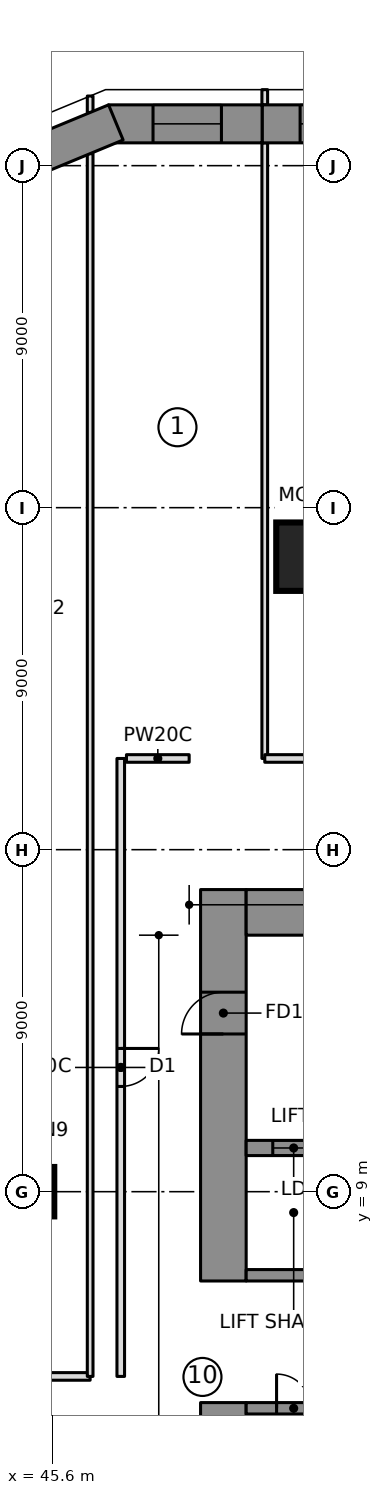
"""IFC4 building model, lengths in metres.
Left out: names, types, materials, properties, quantities, classifications, styles, units other than length and angle.
Written with IfcOpenShell. Run it as: python <this file> out.ifc"""

import sys

from ifc_helpers import new_model, si_unit, direction, frame, frame_2d, origin, origin_2d, place, context, subcontext, project, spatial, polyline, rectangle, outline, extrude, element, fill, save


model = new_model("IFC4")
c1 = context("Model", 3, precision=1e-05, world=origin(), true_north=direction((0.0, 1.0)))
c2 = subcontext(c1, "Body", "Model", "MODEL_VIEW")
j1 = project(units=[si_unit("LENGTHUNIT", "METRE"), si_unit("PLANEANGLEUNIT", "RADIAN")], contexts=[c1])
p1 = place(None, origin())
s1 = spatial("IfcSite", under=j1, at=p1, CompositionType="ELEMENT")
p2 = place(p1, origin())
s2 = spatial("IfcBuilding", under=s1, at=p2, CompositionType="ELEMENT")
p3 = place(p2, frame((0.0, 0.0, 19.0)))
s3 = spatial("IfcBuildingStorey", under=s2, at=p3, CompositionType="ELEMENT", Elevation=19.0)
p4 = place(p3, frame((50.1, 6.65, 0.0), z_axis=(0.0, 0.0, 1.0), x_axis=(0.0, 1.0, 0.0)))
e1 = element("IfcWall", 1, at=p4, inside=s3, PredefinedType="SHEAR", context=c2, shape_type="SweptSolid", body=[
    extrude(rectangle(XDim=10.3, YDim=1.2, at=frame_2d((5.15, 0.0))), origin(), (0.0, 0.0, 1.0), 5.0),
])
p5 = place(p4, frame((6.5, 0.0, 0.0)))
e2 = element("IfcOpeningElement", 2, at=p5, cuts=e1, PredefinedType="OPENING", context=c2, shape_type="SweptSolid", body=[
    extrude(rectangle(XDim=1.1, YDim=2.1, at=frame_2d((0.55, 1.05))), frame((0.0, 0.61, 0.0), z_axis=(0.0, -1.0, 0.0), x_axis=(1.0, 0.0, 0.0)), (0.0, 0.0, 1.0), 1.22),
])
p6 = place(p3, frame((50.1, -3.45, 0.0), z_axis=(0.0, 0.0, 1.0), x_axis=(0.0, 1.0, 0.0)))
e3 = element("IfcWall", 3, at=p6, inside=s3, PredefinedType="SHEAR", context=c2, shape_type="SweptSolid", body=[
    extrude(rectangle(XDim=6.9, YDim=1.2, at=frame_2d((3.45, 0.0))), origin(), (0.0, 0.0, 1.0), 5.0),
])
p7 = place(p3, frame((50.7, 16.35, 0.0), z_axis=(0.0, 0.0, 1.0), x_axis=(1.0, 0.0, 0.0)))
e4 = element("IfcWall", 4, at=p7, inside=s3, PredefinedType="SHEAR", context=c2, shape_type="SweptSolid", body=[
    extrude(rectangle(XDim=13.38, YDim=1.2, at=frame_2d((6.69, 0.0))), origin(), (0.0, 0.0, 1.0), 5.0),
])
p8 = place(p3, frame((50.7, 10.15, 0.0), z_axis=(0.0, 0.0, 1.0), x_axis=(1.0, 0.0, 0.0)))
e5 = element("IfcWall", 5, at=p8, inside=s3, PredefinedType="SHEAR", context=c2, shape_type="SweptSolid", body=[
    extrude(rectangle(XDim=12.18, YDim=0.4, at=frame_2d((6.09, 0.0))), origin(), (0.0, 0.0, 1.0), 5.0),
])
p9 = place(p8, frame((0.7, 0.0, 0.0)))
e6 = element("IfcOpeningElement", 6, at=p9, cuts=e5, PredefinedType="OPENING", context=c2, shape_type="SweptSolid", body=[
    extrude(rectangle(XDim=1.1, YDim=2.1, at=frame_2d((0.55, 1.05))), frame((0.0, 0.21, 0.0), z_axis=(0.0, -1.0, 0.0), x_axis=(1.0, 0.0, 0.0)), (0.0, 0.0, 1.0), 0.42),
])
p10 = place(p8, frame((3.5, 0.0, 0.0)))
e7 = element("IfcOpeningElement", 7, at=p10, cuts=e5, PredefinedType="OPENING", context=c2, shape_type="SweptSolid", body=[
    extrude(rectangle(XDim=1.1, YDim=2.1, at=frame_2d((0.55, 1.05))), frame((0.0, 0.21, 0.0), z_axis=(0.0, -1.0, 0.0), x_axis=(1.0, 0.0, 0.0)), (0.0, 0.0, 1.0), 0.42),
])
p11 = place(p3, frame((50.7, 3.3, 0.0), z_axis=(0.0, 0.0, 1.0), x_axis=(1.0, 0.0, 0.0)))
e8 = element("IfcWall", 8, at=p11, inside=s3, PredefinedType="SHEAR", context=c2, shape_type="SweptSolid", body=[
    extrude(rectangle(XDim=10.9, YDim=0.3, at=frame_2d((5.45, 0.0))), origin(), (0.0, 0.0, 1.0), 5.0),
])
p12 = place(p11, frame((0.8, 0.0, 0.0)))
e9 = element("IfcOpeningElement", 9, at=p12, cuts=e8, PredefinedType="OPENING", context=c2, shape_type="SweptSolid", body=[
    extrude(rectangle(XDim=0.9, YDim=2.1, at=frame_2d((0.45, 1.05))), frame((0.0, 0.16, 0.0), z_axis=(0.0, -1.0, 0.0), x_axis=(1.0, 0.0, 0.0)), (0.0, 0.0, 1.0), 0.32),
])
p13 = place(p11, frame((3.6, 0.0, 0.0)))
e10 = element("IfcOpeningElement", 10, at=p13, cuts=e8, PredefinedType="OPENING", context=c2, shape_type="SweptSolid", body=[
    extrude(rectangle(XDim=0.9, YDim=2.1, at=frame_2d((0.45, 1.05))), frame((0.0, 0.16, 0.0), z_axis=(0.0, -1.0, 0.0), x_axis=(1.0, 0.0, 0.0)), (0.0, 0.0, 1.0), 0.32),
])
p14 = place(p11, frame((6.4, 0.0, 0.0)))
e11 = element("IfcOpeningElement", 11, at=p14, cuts=e8, PredefinedType="OPENING", context=c2, shape_type="SweptSolid", body=[
    extrude(rectangle(XDim=0.9, YDim=2.1, at=frame_2d((0.45, 1.05))), frame((0.0, 0.16, 0.0), z_axis=(0.0, -1.0, 0.0), x_axis=(1.0, 0.0, 0.0)), (0.0, 0.0, 1.0), 0.32),
])
p15 = place(p11, frame((9.2, 0.0, 0.0)))
e12 = element("IfcOpeningElement", 12, at=p15, cuts=e8, PredefinedType="OPENING", context=c2, shape_type="SweptSolid", body=[
    extrude(rectangle(XDim=0.9, YDim=2.1, at=frame_2d((0.45, 1.05))), frame((0.0, 0.16, 0.0), z_axis=(0.0, -1.0, 0.0), x_axis=(1.0, 0.0, 0.0)), (0.0, 0.0, 1.0), 0.32),
])
p16 = place(p3, frame((50.7, 6.8, 0.0), z_axis=(0.0, 0.0, 1.0), x_axis=(1.0, 0.0, 0.0)))
e13 = element("IfcWall", 13, at=p16, inside=s3, PredefinedType="SHEAR", context=c2, shape_type="SweptSolid", body=[
    extrude(rectangle(XDim=10.9, YDim=0.3, at=frame_2d((5.45, 0.0))), origin(), (0.0, 0.0, 1.0), 5.0),
])
p17 = place(p16, frame((6.3, 0.0, 0.0)))
e14 = element("IfcOpeningElement", 14, at=p17, cuts=e13, PredefinedType="OPENING", context=c2, shape_type="SweptSolid", body=[
    extrude(rectangle(XDim=1.1, YDim=2.1, at=frame_2d((0.55, 1.05))), frame((0.0, 0.16, 0.0), z_axis=(0.0, -1.0, 0.0), x_axis=(1.0, 0.0, 0.0)), (0.0, 0.0, 1.0), 0.32),
])
p18 = place(p16, frame((9.1, 0.0, 0.0)))
e15 = element("IfcOpeningElement", 15, at=p18, cuts=e13, PredefinedType="OPENING", context=c2, shape_type="SweptSolid", body=[
    extrude(rectangle(XDim=1.1, YDim=2.1, at=frame_2d((0.55, 1.05))), frame((0.0, 0.16, 0.0), z_axis=(0.0, -1.0, 0.0), x_axis=(1.0, 0.0, 0.0)), (0.0, 0.0, 1.0), 0.32),
])
p19 = place(p3, frame((52.392, 25.71, 0.0), z_axis=(0.0, 0.0, 1.0), x_axis=(1.0, 0.0, 0.0)))
e16 = element("IfcColumn", 16, at=p19, inside=s3, PredefinedType="COLUMN", context=c2, shape_type="SweptSolid", body=[
    extrude(rectangle(XDim=1.8, YDim=1.8, at=origin_2d()), origin(), (0.0, 0.0, 1.0), 5.0),
])
p20 = place(p3, frame((45.0, 9.0, 0.0), z_axis=(0.0, 0.0, 1.0), x_axis=(1.0, 0.0, 0.0)))
e17 = element("IfcColumn", 17, at=p20, inside=s3, PredefinedType="COLUMN", context=c2, shape_type="SweptSolid", body=[
    extrude(rectangle(XDim=1.3, YDim=1.3, at=origin_2d()), origin(), (0.0, 0.0, 1.0), 5.0),
])
p21 = place(p3, frame((55.06, 37.1, 0.0), z_axis=(0.0, 0.0, 1.0), x_axis=(-1.0, 0.0, 0.0)))
e18 = element("IfcWall", 18, at=p21, inside=s3, PredefinedType="NOTDEFINED", context=c2, shape_type="SweptSolid", body=[
    extrude(outline(polyline([(0.0, -0.5), (3.94, -0.5), (3.94, 0.5), (0.0, 0.5), (0.0, -0.5)])), origin(), (0.0, 0.0, 1.0), 4.7),
])
p22 = place(p21, frame((1.96, 0.0, 0.9)))
e19 = element("IfcOpeningElement", 19, at=p22, cuts=e18, PredefinedType="OPENING", context=c2, shape_type="SweptSolid", body=[
    extrude(rectangle(XDim=0.981, YDim=2.4, at=frame_2d((0.49, 1.2))), frame((0.0, 0.51, 0.0), z_axis=(0.0, -1.0, 0.0), x_axis=(1.0, 0.0, 0.0)), (0.0, 0.0, 1.0), 1.02),
])
p23 = place(p3, frame((51.119, 37.1, 0.0), z_axis=(0.0, 0.0, 1.0), x_axis=(-1.0, 0.0, 0.0)))
e20 = element("IfcWall", 20, at=p23, inside=s3, PredefinedType="NOTDEFINED", context=c2, shape_type="SweptSolid", body=[
    extrude(outline(polyline([(0.0, -0.5), (4.04, -0.5), (3.841, 0.5), (0.0, 0.5), (0.0, -0.5)])), origin(), (0.0, 0.0, 1.0), 4.7),
])
p24 = place(p23, frame((1.07, 0.0, 0.9)))
e21 = element("IfcOpeningElement", 21, at=p24, cuts=e20, PredefinedType="OPENING", context=c2, shape_type="SweptSolid", body=[
    extrude(rectangle(XDim=1.8, YDim=2.4, at=frame_2d((0.9, 1.2))), frame((0.0, 0.51, 0.0), z_axis=(0.0, -1.0, 0.0), x_axis=(1.0, 0.0, 0.0)), (0.0, 0.0, 1.0), 1.02),
])
p25 = place(p3, frame((47.179, 37.1, 0.0), z_axis=(0.0, 0.0, 1.0), x_axis=(-0.923862365102, -0.382724875529, 0.0)))
e22 = element("IfcWall", 22, at=p25, inside=s3, PredefinedType="NOTDEFINED", context=c2, shape_type="SweptSolid", body=[
    extrude(outline(polyline([(-0.1, -0.5), (3.482, -0.5), (3.068, 0.5), (0.1, 0.5), (-0.1, -0.5)])), origin(), (0.0, 0.0, 1.0), 4.7),
])
p26 = place(p3, frame((43.43, 4.139, 0.0), z_axis=(0.0, 0.0, 1.0), x_axis=(1.0, 0.0, 0.0)))
e23 = element("IfcWall", 23, at=p26, inside=s3, PredefinedType="PARTITIONING", context=c2, shape_type="SweptSolid", body=[
    extrude(rectangle(XDim=3.165, YDim=0.2, at=frame_2d((1.582, 0.0))), origin(), (0.0, 0.0, 1.0), 4.65),
])
p27 = place(p26, frame((0.367, 0.0, 0.0)))
e24 = element("IfcOpeningElement", 24, at=p27, cuts=e23, PredefinedType="OPENING", context=c2, shape_type="SweptSolid", body=[
    extrude(rectangle(XDim=1.0, YDim=2.1, at=frame_2d((0.5, 1.05))), frame((0.0, 0.11, 0.0), z_axis=(0.0, -1.0, 0.0), x_axis=(1.0, 0.0, 0.0)), (0.0, 0.0, 1.0), 0.22),
])
p28 = place(p3, frame((46.594, 4.139, 0.0), z_axis=(0.0, 0.0, 1.0), x_axis=(0.0, 1.0, 0.0)))
e25 = element("IfcWall", 25, at=p28, inside=s3, PredefinedType="PARTITIONING", context=c2, shape_type="SweptSolid", body=[
    extrude(rectangle(XDim=32.178, YDim=0.15, at=frame_2d((16.089, 0.0))), origin(), (0.0, 0.0, 1.0), 4.65),
])
p29 = place(p3, frame((46.594, 37.399, 0.0), z_axis=(0.0, 0.0, 1.0), x_axis=(0.0, 1.0, 0.0)))
e26 = element("IfcWall", 26, at=p29, inside=s3, PredefinedType="PARTITIONING", context=c2, shape_type="SweptSolid", body=[
    extrude(rectangle(XDim=0.433, YDim=0.15, at=frame_2d((0.216, 0.0))), origin(), (0.0, 0.0, 1.0), 4.65),
])
p30 = place(p3, frame((51.189, 20.4, 0.0), z_axis=(0.0, 0.0, 1.0), x_axis=(0.0, 1.0, 0.0)))
e27 = element("IfcWall", 27, at=p30, inside=s3, PredefinedType="PARTITIONING", context=c2, shape_type="SweptSolid", body=[
    extrude(rectangle(XDim=16.2, YDim=0.15, at=frame_2d((8.1, 0.0))), origin(), (0.0, 0.0, 1.0), 4.65),
])
p31 = place(p3, frame((51.189, 37.6, 0.0), z_axis=(0.0, 0.0, 1.0), x_axis=(0.0, 1.0, 0.0)))
e28 = element("IfcWall", 28, at=p31, inside=s3, PredefinedType="PARTITIONING", context=c2, shape_type="SweptSolid", body=[
    extrude(rectangle(XDim=0.4, YDim=0.15, at=frame_2d((0.2, 0.0))), origin(), (0.0, 0.0, 1.0), 4.65),
])
p32 = place(p3, frame((47.4, 20.4, 0.0), z_axis=(0.0, 0.0, 1.0), x_axis=(0.0, -1.0, 0.0)))
e29 = element("IfcWall", 29, at=p32, inside=s3, PredefinedType="PARTITIONING", context=c2, shape_type="SweptSolid", body=[
    extrude(rectangle(XDim=16.261, YDim=0.2, at=frame_2d((8.131, 0.0))), origin(), (0.0, 0.0, 1.0), 4.65),
])
p33 = place(p32, frame((7.631, 0.0, 0.0)))
e30 = element("IfcOpeningElement", 30, at=p33, cuts=e29, PredefinedType="OPENING", context=c2, shape_type="SweptSolid", body=[
    extrude(rectangle(XDim=1.0, YDim=2.1, at=frame_2d((0.5, 1.05))), frame((0.0, 0.11, 0.0), z_axis=(0.0, -1.0, 0.0), x_axis=(1.0, 0.0, 0.0)), (0.0, 0.0, 1.0), 0.22),
])
p34 = place(p3, frame((61.297, 20.4, 0.0), z_axis=(0.0, 0.0, 1.0), x_axis=(-1.0, 0.0, 0.0)))
e31 = element("IfcWall", 31, at=p34, inside=s3, PredefinedType="PARTITIONING", context=c2, shape_type="SweptSolid", body=[
    extrude(rectangle(XDim=10.108, YDim=0.2, at=frame_2d((5.054, 0.0))), origin(), (0.0, 0.0, 1.0), 4.65),
])
p35 = place(p34, frame((4.554, 0.0, 0.0)))
e32 = element("IfcOpeningElement", 32, at=p35, cuts=e31, PredefinedType="OPENING", context=c2, shape_type="SweptSolid", body=[
    extrude(rectangle(XDim=1.0, YDim=2.1, at=frame_2d((0.5, 1.05))), frame((0.0, 0.11, 0.0), z_axis=(0.0, -1.0, 0.0), x_axis=(1.0, 0.0, 0.0)), (0.0, 0.0, 1.0), 0.22),
])
p36 = place(p3, frame((47.55, 20.4, 0.0), z_axis=(0.0, 0.0, 1.0), x_axis=(1.0, 0.0, 0.0)))
e33 = element("IfcWall", 33, at=p36, inside=s3, PredefinedType="PARTITIONING", context=c2, shape_type="SweptSolid", body=[
    extrude(rectangle(XDim=1.65, YDim=0.2, at=frame_2d((0.825, 0.0))), origin(), (0.0, 0.0, 1.0), 4.65),
])
p37 = place(p22, origin())
e34 = element("IfcWindow", 34, at=p37, inside=s3, PartitioningType="SINGLE_PANEL", PredefinedType="WINDOW", context=c2, shape_type="SweptSolid", body=[
    extrude(rectangle(XDim=0.981, YDim=2.4, at=frame_2d((0.49, 1.2))), frame((0.0, 0.5, 0.0), z_axis=(0.0, -1.0, 0.0), x_axis=(1.0, 0.0, 0.0)), (0.0, 0.0, 1.0), 0.06),
])
fill(e19, e34)
p38 = place(p24, origin())
e35 = element("IfcWindow", 35, at=p38, inside=s3, PartitioningType="SINGLE_PANEL", PredefinedType="WINDOW", context=c2, shape_type="SweptSolid", body=[
    extrude(rectangle(XDim=1.8, YDim=2.4, at=frame_2d((0.9, 1.2))), frame((0.0, 0.5, 0.0), z_axis=(0.0, -1.0, 0.0), x_axis=(1.0, 0.0, 0.0)), (0.0, 0.0, 1.0), 0.06),
])
fill(e21, e35)
p39 = place(p33, origin())
e36 = element("IfcDoor", 36, at=p39, inside=s3, OperationType="SINGLE_SWING_LEFT", PredefinedType="DOOR", context=c2, shape_type="SweptSolid", body=[
    extrude(rectangle(XDim=1.0, YDim=2.1, at=frame_2d((0.5, 1.05))), frame((0.0, 0.025, 0.0), z_axis=(0.0, -1.0, 0.0), x_axis=(1.0, 0.0, 0.0)), (0.0, 0.0, 1.0), 0.05),
])
fill(e30, e36)
p40 = place(p9, origin())
e37 = element("IfcDoor", 37, at=p40, inside=s3, OperationType="DOUBLE_DOOR_SLIDING", PredefinedType="DOOR", context=c2, shape_type="SweptSolid", body=[
    extrude(rectangle(XDim=1.1, YDim=2.1, at=frame_2d((0.55, 1.05))), frame((0.0, 0.025, 0.0), z_axis=(0.0, -1.0, 0.0), x_axis=(1.0, 0.0, 0.0)), (0.0, 0.0, 1.0), 0.05),
])
fill(e6, e37)
p41 = place(p5, origin())
e38 = element("IfcDoor", 38, at=p41, inside=s3, OperationType="SINGLE_SWING_RIGHT", PredefinedType="DOOR", context=c2, shape_type="SweptSolid", body=[
    extrude(rectangle(XDim=1.1, YDim=2.1, at=frame_2d((0.55, 1.05))), frame((0.0, 0.025, 0.0), z_axis=(0.0, -1.0, 0.0), x_axis=(1.0, 0.0, 0.0)), (0.0, 0.0, 1.0), 0.05),
])
fill(e2, e38)
p42 = place(p12, origin())
e39 = element("IfcDoor", 39, at=p42, inside=s3, OperationType="SINGLE_SWING_LEFT", PredefinedType="DOOR", context=c2, shape_type="SweptSolid", body=[
    extrude(rectangle(XDim=0.9, YDim=2.1, at=frame_2d((0.45, 1.05))), frame((0.0, 0.025, 0.0), z_axis=(0.0, -1.0, 0.0), x_axis=(1.0, 0.0, 0.0)), (0.0, 0.0, 1.0), 0.05),
])
fill(e9, e39)
save(model, sys.argv[1])
